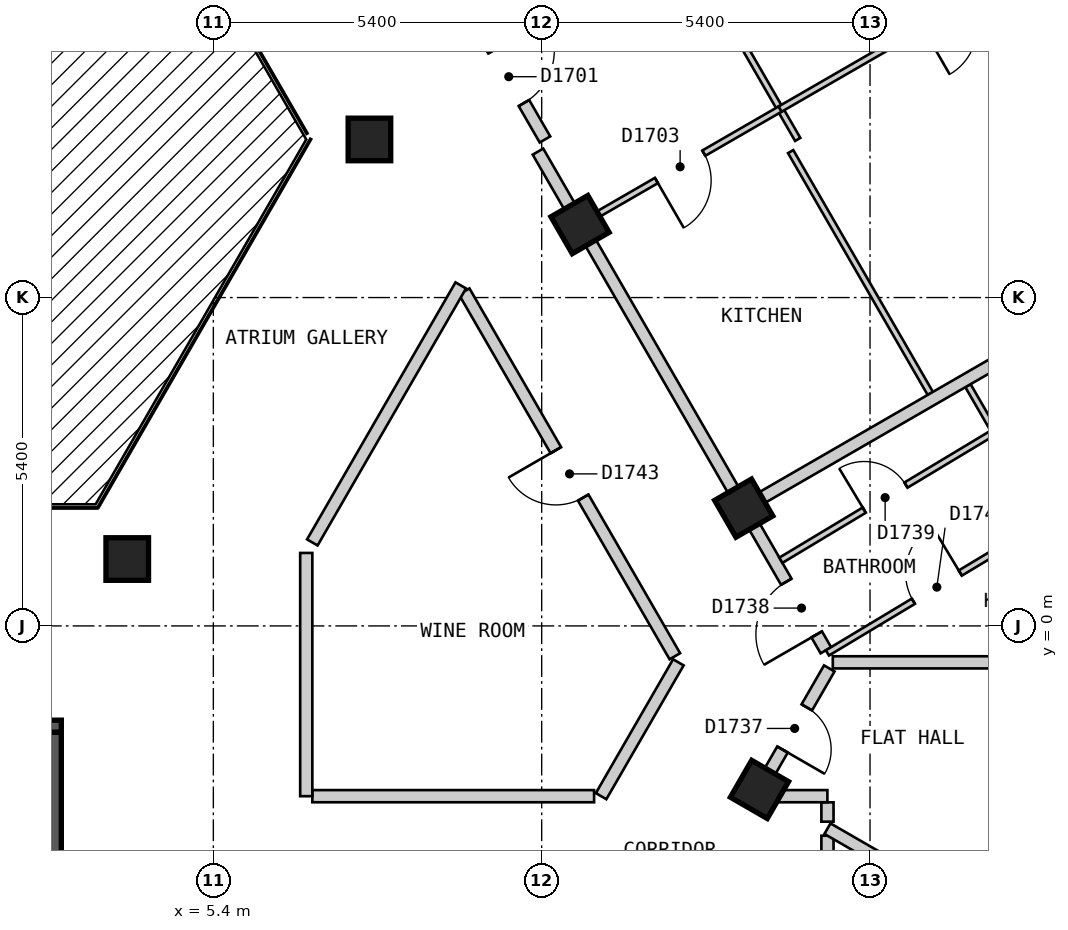
"""IFC4 building model, lengths in metres.
Left out: names, types, materials, properties, quantities, classifications, styles, units other than length and angle.
Written with IfcOpenShell. Run it as: python <this file> out.ifc"""

import sys

from ifc_helpers import new_model, si_unit, direction, frame, frame_2d, origin, origin_2d, place, context, subcontext, project, spatial, polyline, rectangle, outline, extrude, element, fill, save


model = new_model("IFC4")
c1 = context("Model", 3, precision=1e-05, world=origin(), true_north=direction((0.0, 1.0)))
c2 = subcontext(c1, "Body", "Model", "MODEL_VIEW")
j1 = project(units=[si_unit("LENGTHUNIT", "METRE"), si_unit("PLANEANGLEUNIT", "RADIAN")], contexts=[c1])
p1 = place(None, origin())
s1 = spatial("IfcSite", under=j1, at=p1, CompositionType="ELEMENT")
p2 = place(p1, origin())
s2 = spatial("IfcBuilding", under=s1, at=p2, CompositionType="ELEMENT")
p3 = place(p2, frame((0.0, 0.0, 187.2)))
s3 = spatial("IfcBuildingStorey", under=s2, at=p3, CompositionType="ELEMENT", Elevation=187.2)
for number, where, z_axis, x_axis in (
    (1, (14.382, -2.689, 0.0), (0.0, 0.0, 1.0), (0.5, 0.866, 0.0)),
    (2, (14.123, 1.937, 0.0), (0.0, 0.0, 1.0), (-0.5, 0.866, 0.0)),
    (3, (3.984, 1.1, 0.0), (0.0, 0.0, 1.0), (1.0, 0.0, 0.0)),
    (4, (11.431, 6.6, 0.0), (0.0, 0.0, 1.0), (-0.5, 0.866, 0.0)),
    (5, (7.967, 8.0, 0.0), (0.0, 0.0, 1.0), (1.0, 0.0, 0.0)),
):
    element("IfcColumn", number, at=place(p3, frame(where, z_axis=z_axis, x_axis=x_axis)), inside=s3, PredefinedType="COLUMN", context=c2, shape_type="SweptSolid", body=[
        extrude(rectangle(XDim=0.7, YDim=0.7, at=origin_2d()), origin(), (0.0, 0.0, 1.0), 3.0),
    ])
p4 = place(p3, frame((15.631, -21.025, 0.0), z_axis=(0.0, 0.0, 1.0), x_axis=(0.500018670445, 0.86601462413, 0.0)))
e6 = element("IfcWall", 6, at=p4, inside=s3, PredefinedType="SOLIDWALL", context=c2, shape_type="SweptSolid", body=[
    extrude(outline(polyline([(0.0, -0.15), (20.785, -0.15), (20.705, 0.15), (0.08, 0.15), (0.0, -0.15)])), origin(), (0.0, 0.0, 1.0), 2.7),
])
p5 = place(p4, frame((2.346, 0.0, 0.15)))
e7 = element("IfcOpeningElement", 7, at=p5, cuts=e6, PredefinedType="OPENING", context=c2, shape_type="SweptSolid", body=[
    extrude(rectangle(XDim=1.5, YDim=2.1, at=frame_2d((0.75, 1.05))), frame((0.0, 0.16, 0.0), z_axis=(0.0, -1.0, 0.0), x_axis=(1.0, 0.0, 0.0)), (0.0, 0.0, 1.0), 0.32),
])
p6 = place(p4, frame((7.21, 0.0, 0.15)))
e8 = element("IfcOpeningElement", 8, at=p6, cuts=e6, PredefinedType="OPENING", context=c2, shape_type="SweptSolid", body=[
    extrude(rectangle(XDim=1.5, YDim=2.1, at=frame_2d((0.75, 1.05))), frame((0.0, 0.16, 0.0), z_axis=(0.0, -1.0, 0.0), x_axis=(1.0, 0.0, 0.0)), (0.0, 0.0, 1.0), 0.32),
])
p7 = place(p4, frame((12.073, 0.0, 0.15)))
e9 = element("IfcOpeningElement", 9, at=p7, cuts=e6, PredefinedType="OPENING", context=c2, shape_type="SweptSolid", body=[
    extrude(rectangle(XDim=1.5, YDim=2.1, at=frame_2d((0.75, 1.05))), frame((0.0, 0.16, 0.0), z_axis=(0.0, -1.0, 0.0), x_axis=(1.0, 0.0, 0.0)), (0.0, 0.0, 1.0), 0.32),
])
p8 = place(p4, frame((16.938, 0.0, 0.15)))
e10 = element("IfcOpeningElement", 10, at=p8, cuts=e6, PredefinedType="OPENING", context=c2, shape_type="SweptSolid", body=[
    extrude(rectangle(XDim=1.5, YDim=2.1, at=frame_2d((0.75, 1.05))), frame((0.0, 0.16, 0.0), z_axis=(0.0, -1.0, 0.0), x_axis=(1.0, 0.0, 0.0)), (0.0, 0.0, 1.0), 0.32),
])
p9 = place(p3, frame((26.024, 1.825, 0.0), z_axis=(0.0, 0.0, 1.0), x_axis=(-0.500010537973, 0.866019319597, 0.0)))
e11 = element("IfcWall", 11, at=p9, inside=s3, PredefinedType="SOLIDWALL", context=c2, shape_type="SweptSolid", body=[
    extrude(outline(polyline([(0.0, -0.15), (22.863, -0.15), (22.783, 0.15), (0.08, 0.15), (0.0, -0.15)])), origin(), (0.0, 0.0, 1.0), 2.7),
])
p10 = place(p9, frame((2.606, 0.0, 0.15)))
e12 = element("IfcOpeningElement", 12, at=p10, cuts=e11, PredefinedType="OPENING", context=c2, shape_type="SweptSolid", body=[
    extrude(rectangle(XDim=1.5, YDim=2.1, at=frame_2d((0.75, 1.05))), frame((0.0, 0.16, 0.0), z_axis=(0.0, -1.0, 0.0), x_axis=(1.0, 0.0, 0.0)), (0.0, 0.0, 1.0), 0.32),
])
p11 = place(p9, frame((7.99, 0.0, 0.15)))
e13 = element("IfcOpeningElement", 13, at=p11, cuts=e11, PredefinedType="OPENING", context=c2, shape_type="SweptSolid", body=[
    extrude(rectangle(XDim=1.5, YDim=2.1, at=frame_2d((0.75, 1.05))), frame((0.0, 0.16, 0.0), z_axis=(0.0, -1.0, 0.0), x_axis=(1.0, 0.0, 0.0)), (0.0, 0.0, 1.0), 0.32),
])
p12 = place(p9, frame((13.373, 0.0, 0.15)))
e14 = element("IfcOpeningElement", 14, at=p12, cuts=e11, PredefinedType="OPENING", context=c2, shape_type="SweptSolid", body=[
    extrude(rectangle(XDim=1.5, YDim=2.1, at=frame_2d((0.75, 1.05))), frame((0.0, 0.16, 0.0), z_axis=(0.0, -1.0, 0.0), x_axis=(1.0, 0.0, 0.0)), (0.0, 0.0, 1.0), 0.32),
])
p13 = place(p9, frame((18.758, 0.0, 0.15)))
e15 = element("IfcOpeningElement", 15, at=p13, cuts=e11, PredefinedType="OPENING", context=c2, shape_type="SweptSolid", body=[
    extrude(rectangle(XDim=1.5, YDim=2.1, at=frame_2d((0.75, 1.05))), frame((0.0, 0.16, 0.0), z_axis=(0.0, -1.0, 0.0), x_axis=(1.0, 0.0, 0.0)), (0.0, 0.0, 1.0), 0.32),
])
p14 = place(p3, frame((-2.9, -1.65, 0.0), z_axis=(0.0, 0.0, 1.0), x_axis=(1.0, 0.0, 0.0)))
e16 = element("IfcWall", 16, at=p14, inside=s3, PredefinedType="SOLIDWALL", context=c2, shape_type="SweptSolid", body=[
    extrude(rectangle(XDim=5.8, YDim=0.2, at=frame_2d((2.9, 0.0))), origin(), (0.0, 0.0, 1.0), 2.7),
])
p15 = place(p14, frame((0.3, 0.0, 0.0)))
e17 = element("IfcOpeningElement", 17, at=p15, cuts=e16, PredefinedType="OPENING", context=c2, shape_type="SweptSolid", body=[
    extrude(rectangle(XDim=1.2, YDim=2.1, at=frame_2d((0.6, 1.05))), frame((0.0, 0.11, 0.0), z_axis=(0.0, -1.0, 0.0), x_axis=(1.0, 0.0, 0.0)), (0.0, 0.0, 1.0), 0.22),
])
p16 = place(p3, frame((2.8, -4.5, 0.0), z_axis=(0.0, 0.0, 1.0), x_axis=(0.0, 1.0, 0.0)))
e18 = element("IfcWall", 18, at=p16, inside=s3, PredefinedType="SOLIDWALL", context=c2, shape_type="SweptSolid", body=[
    extrude(rectangle(XDim=2.75, YDim=0.2, at=frame_2d((1.375, 0.0))), origin(), (0.0, 0.0, 1.0), 2.7),
])
p17 = place(p3, frame((9.526, 5.5, 0.0), z_axis=(0.0, 0.0, 1.0), x_axis=(0.500062092869, -0.865989551482, 0.0)))
e19 = element("IfcWall", 19, at=p17, inside=s3, PredefinedType="PARTITIONING", context=c2, shape_type="SweptSolid", body=[
    extrude(rectangle(XDim=6.927, YDim=0.2, at=frame_2d((3.464, 0.0))), origin(), (0.0, 0.0, 1.0), 2.7),
])
p18 = place(p17, frame((3.014, 0.0, 0.0)))
e20 = element("IfcOpeningElement", 20, at=p18, cuts=e19, PredefinedType="OPENING", context=c2, shape_type="SweptSolid", body=[
    extrude(rectangle(XDim=0.9, YDim=2.1, at=frame_2d((0.45, 1.05))), frame((0.0, 0.11, 0.0), z_axis=(0.0, -1.0, 0.0), x_axis=(1.0, 0.0, 0.0)), (0.0, 0.0, 1.0), 0.22),
])
p19 = place(p3, frame((10.739, 7.8, 0.0), z_axis=(0.0, 0.0, 1.0), x_axis=(0.500023726918, -0.866011704609, 0.0)))
e21 = element("IfcWall", 21, at=p19, inside=s3, PredefinedType="PARTITIONING", context=c2, shape_type="SweptSolid", body=[
    extrude(rectangle(XDim=9.47, YDim=0.2, at=frame_2d((4.735, 0.0))), origin(), (0.0, 0.0, 1.0), 2.7),
])
p20 = place(p19, frame((8.168, 0.0, 0.0)))
e22 = element("IfcOpeningElement", 22, at=p20, cuts=e21, PredefinedType="OPENING", context=c2, shape_type="SweptSolid", body=[
    extrude(rectangle(XDim=1.0, YDim=2.1, at=frame_2d((0.5, 1.05))), frame((0.0, 0.11, 0.0), z_axis=(0.0, -1.0, 0.0), x_axis=(1.0, 0.0, 0.0)), (0.0, 0.0, 1.0), 0.22),
])
p21 = place(p3, frame((5.485, 17.3, 0.0), z_axis=(0.0, 0.0, 1.0), x_axis=(0.499965832213, -0.866045129667, 0.0)))
e23 = element("IfcWall", 23, at=p21, inside=s3, PredefinedType="PARTITIONING", context=c2, shape_type="SweptSolid", body=[
    extrude(rectangle(XDim=10.739, YDim=0.2, at=frame_2d((5.369, 0.0))), origin(), (0.0, 0.0, 1.0), 2.7),
])
p22 = place(p21, frame((9.047, 0.0, 0.0)))
e24 = element("IfcOpeningElement", 24, at=p22, cuts=e23, PredefinedType="OPENING", context=c2, shape_type="SweptSolid", body=[
    extrude(rectangle(XDim=1.0, YDim=2.1, at=frame_2d((0.5, 1.05))), frame((0.0, 0.11, 0.0), z_axis=(0.0, -1.0, 0.0), x_axis=(1.0, 0.0, 0.0)), (0.0, 0.0, 1.0), 0.22),
])
p23 = place(p3, frame((15.5, -2.901, 0.0), z_axis=(0.0, 0.0, 1.0), x_axis=(0.0, -1.0, 0.0)))
e25 = element("IfcWall", 25, at=p23, inside=s3, PredefinedType="PARTITIONING", context=c2, shape_type="SweptSolid", body=[
    extrude(rectangle(XDim=0.318, YDim=0.2, at=frame_2d((0.159, 0.0))), origin(), (0.0, 0.0, 1.0), 2.7),
])
p24 = place(p3, frame((7.028, -2.8, 0.0), z_axis=(0.0, 0.0, 1.0), x_axis=(1.0, 0.0, 0.0)))
e26 = element("IfcWall", 26, at=p24, inside=s3, PredefinedType="PARTITIONING", context=c2, shape_type="SweptSolid", body=[
    extrude(rectangle(XDim=4.634, YDim=0.2, at=frame_2d((2.317, 0.0))), origin(), (0.0, 0.0, 1.0), 2.7),
])
p25 = place(p3, frame((14.433, -2.8, 0.0), z_axis=(0.0, 0.0, 1.0), x_axis=(1.0, 0.0, 0.0)))
e27 = element("IfcWall", 27, at=p25, inside=s3, PredefinedType="PARTITIONING", context=c2, shape_type="SweptSolid", body=[
    extrude(rectangle(XDim=1.066, YDim=0.2, at=frame_2d((0.533, 0.0))), origin(), (0.0, 0.0, 1.0), 2.7),
])
p26 = place(p3, frame((7.028, 1.373, 0.0), z_axis=(0.0, 0.0, 1.0), x_axis=(0.500065924398, 0.86598733897, 0.0)))
e28 = element("IfcWall", 28, at=p26, inside=s3, PredefinedType="PARTITIONING", context=c2, shape_type="SweptSolid", body=[
    extrude(rectangle(XDim=4.881, YDim=0.2, at=frame_2d((2.44, 0.0))), origin(), (0.0, 0.0, 1.0), 2.7),
])
p27 = place(p3, frame((11.777, -2.8, 0.0), z_axis=(0.0, 0.0, 1.0), x_axis=(0.500085537782, 0.86597601289, 0.0)))
e29 = element("IfcWall", 29, at=p27, inside=s3, PredefinedType="PARTITIONING", context=c2, shape_type="SweptSolid", body=[
    extrude(rectangle(XDim=2.542, YDim=0.2, at=frame_2d((1.271, 0.0))), origin(), (0.0, 0.0, 1.0), 2.7),
])
p28 = place(p3, frame((14.318, -2.8, 0.0), z_axis=(0.0, 0.0, 1.0), x_axis=(0.49964693309, 0.866229151122, 0.0)))
e30 = element("IfcWall", 30, at=p28, inside=s3, PredefinedType="PARTITIONING", context=c2, shape_type="SweptSolid", body=[
    extrude(rectangle(XDim=2.426, YDim=0.2, at=frame_2d((1.213, 0.0))), origin(), (0.0, 0.0, 1.0), 2.7),
])
p29 = place(p28, frame((0.886, 0.0, 0.0)))
e31 = element("IfcOpeningElement", 31, at=p29, cuts=e30, PredefinedType="OPENING", context=c2, shape_type="SweptSolid", body=[
    extrude(rectangle(XDim=0.8, YDim=2.1, at=frame_2d((0.4, 1.05))), frame((0.0, 0.11, 0.0), z_axis=(0.0, -1.0, 0.0), x_axis=(1.0, 0.0, 0.0)), (0.0, 0.0, 1.0), 0.22),
])
p30 = place(p3, frame((6.928, -2.8, 0.0), z_axis=(0.0, 0.0, 1.0), x_axis=(0.0, 1.0, 0.0)))
e32 = element("IfcWall", 32, at=p30, inside=s3, PredefinedType="PARTITIONING", context=c2, shape_type="SweptSolid", body=[
    extrude(rectangle(XDim=4.0, YDim=0.2, at=frame_2d((2.0, 0.0))), origin(), (0.0, 0.0, 1.0), 2.7),
])
p31 = place(p3, frame((15.5, -18.799, 0.0), z_axis=(0.0, 0.0, 1.0), x_axis=(0.0, 1.0, 0.0)))
e33 = element("IfcWall", 33, at=p31, inside=s3, PredefinedType="PARTITIONING", context=c2, shape_type="SweptSolid", body=[
    extrude(rectangle(XDim=15.349, YDim=0.2, at=frame_2d((7.675, 0.0))), origin(), (0.0, 0.0, 1.0), 2.7),
])
p32 = place(p31, frame((11.348, 0.0, 0.0)))
e34 = element("IfcOpeningElement", 34, at=p32, cuts=e33, PredefinedType="OPENING", context=c2, shape_type="SweptSolid", body=[
    extrude(rectangle(XDim=1.0, YDim=2.1, at=frame_2d((0.5, 1.05))), frame((0.0, 0.11, 0.0), z_axis=(0.0, -1.0, 0.0), x_axis=(1.0, 0.0, 0.0)), (0.0, 0.0, 1.0), 0.22),
])
p33 = place(p3, frame((14.895, 7.8, 0.0), z_axis=(0.0, 0.0, 1.0), x_axis=(0.500050787847, -0.865996079421, 0.0)))
e35 = element("IfcWall", 35, at=p33, inside=s3, PredefinedType="PARTITIONING", context=c2, shape_type="SweptSolid", body=[
    extrude(rectangle(XDim=4.591, YDim=0.1, at=frame_2d((2.296, 0.0))), origin(), (0.0, 0.0, 1.0), 2.7),
])
p34 = place(p3, frame((9.526, 17.5, 0.0), z_axis=(0.0, 0.0, 1.0), x_axis=(0.500019134094, -0.866014356428, 0.0)))
e36 = element("IfcWall", 36, at=p34, inside=s3, PredefinedType="PARTITIONING", context=c2, shape_type="SweptSolid", body=[
    extrude(rectangle(XDim=10.97, YDim=0.1, at=frame_2d((5.485, 0.0))), origin(), (0.0, 0.0, 1.0), 2.7),
])
p35 = place(p34, frame((7.25, 0.0, 0.0)))
e37 = element("IfcOpeningElement", 37, at=p35, cuts=e36, PredefinedType="OPENING", context=c2, shape_type="SweptSolid", body=[
    extrude(rectangle(XDim=0.9, YDim=2.1, at=frame_2d((0.45, 1.05))), frame((0.0, 0.06, 0.0), z_axis=(0.0, -1.0, 0.0), x_axis=(1.0, 0.0, 0.0)), (0.0, 0.0, 1.0), 0.12),
])
p36 = place(p3, frame((17.811, 3.951, 0.0), z_axis=(0.0, 0.0, 1.0), x_axis=(0.499976149225, -0.866039173598, 0.0)))
e38 = element("IfcWall", 38, at=p36, inside=s3, PredefinedType="PARTITIONING", context=c2, shape_type="SweptSolid", body=[
    extrude(rectangle(XDim=2.888, YDim=0.1, at=frame_2d((1.444, 0.0))), origin(), (0.0, 0.0, 1.0), 2.7),
])
p37 = place(p36, frame((1.276, 0.0, 0.0)))
e39 = element("IfcOpeningElement", 39, at=p37, cuts=e38, PredefinedType="OPENING", context=c2, shape_type="SweptSolid", body=[
    extrude(rectangle(XDim=0.9, YDim=2.1, at=frame_2d((0.45, 1.05))), frame((0.0, 0.06, 0.0), z_axis=(0.0, -1.0, 0.0), x_axis=(1.0, 0.0, 0.0)), (0.0, 0.0, 1.0), 0.12),
])
p38 = place(p3, frame((11.518, 6.65, 0.0), z_axis=(0.0, 0.0, 1.0), x_axis=(0.865984470368, 0.500070892056, 0.0)))
e40 = element("IfcWall", 40, at=p38, inside=s3, PredefinedType="PARTITIONING", context=c2, shape_type="SweptSolid", body=[
    extrude(rectangle(XDim=3.7, YDim=0.1, at=frame_2d((1.85, 0.0))), origin(), (0.0, 0.0, 1.0), 2.7),
])
p39 = place(p38, frame((1.35, 0.0, 0.0)))
e41 = element("IfcOpeningElement", 41, at=p39, cuts=e40, PredefinedType="OPENING", context=c2, shape_type="SweptSolid", body=[
    extrude(rectangle(XDim=0.9, YDim=2.1, at=frame_2d((0.45, 1.05))), frame((0.0, 0.06, 0.0), z_axis=(0.0, -1.0, 0.0), x_axis=(1.0, 0.0, 0.0)), (0.0, 0.0, 1.0), 0.12),
])
p40 = place(p3, frame((14.734, 1.08, 0.0), z_axis=(0.0, 0.0, 1.0), x_axis=(0.857205608004, 0.514974315482, 0.0)))
e42 = element("IfcWall", 42, at=p40, inside=s3, PredefinedType="PARTITIONING", context=c2, shape_type="SweptSolid", body=[
    extrude(rectangle(XDim=4.051, YDim=0.1, at=frame_2d((2.025, 0.0))), origin(), (0.0, 0.0, 1.0), 2.7),
])
p41 = place(p40, frame((1.6, 0.0, 0.0)))
e43 = element("IfcOpeningElement", 43, at=p41, cuts=e42, PredefinedType="OPENING", context=c2, shape_type="SweptSolid", body=[
    extrude(rectangle(XDim=0.8, YDim=2.1, at=frame_2d((0.4, 1.05))), frame((0.0, 0.06, 0.0), z_axis=(0.0, -1.0, 0.0), x_axis=(1.0, 0.0, 0.0)), (0.0, 0.0, 1.0), 0.12),
])
p42 = place(p3, frame((15.499, -0.444, 0.0), z_axis=(0.0, 0.0, 1.0), x_axis=(0.857061798163, 0.515213619899, 0.0)))
e44 = element("IfcWall", 44, at=p42, inside=s3, PredefinedType="PARTITIONING", context=c2, shape_type="SweptSolid", body=[
    extrude(rectangle(XDim=4.15, YDim=0.1, at=frame_2d((2.075, 0.0))), origin(), (0.0, 0.0, 1.0), 2.7),
])
p43 = place(p42, frame((1.65, 0.0, 0.0)))
e45 = element("IfcOpeningElement", 45, at=p43, cuts=e44, PredefinedType="OPENING", context=c2, shape_type="SweptSolid", body=[
    extrude(rectangle(XDim=0.9, YDim=2.1, at=frame_2d((0.45, 1.05))), frame((0.0, 0.06, 0.0), z_axis=(0.0, -1.0, 0.0), x_axis=(1.0, 0.0, 0.0)), (0.0, 0.0, 1.0), 0.12),
])
p44 = place(p3, frame((15.5, -3.334, 0.0), z_axis=(0.0, 0.0, 1.0), x_axis=(0.866001896501, -0.5000407136, 0.0)))
e46 = element("IfcWall", 46, at=p44, inside=s3, PredefinedType="PARTITIONING", context=c2, shape_type="SweptSolid", body=[
    extrude(rectangle(XDim=8.809, YDim=0.2, at=frame_2d((4.405, 0.0))), origin(), (0.0, 0.0, 1.0), 2.7),
])
p45 = place(p3, frame((15.588, -0.599, 0.0), z_axis=(0.0, 0.0, 1.0), x_axis=(1.0, 0.0, 0.0)))
e47 = element("IfcWall", 47, at=p45, inside=s3, PredefinedType="PARTITIONING", context=c2, shape_type="SweptSolid", body=[
    extrude(rectangle(XDim=10.266, YDim=0.2, at=frame_2d((5.133, 0.0))), origin(), (0.0, 0.0, 1.0), 2.7),
])
p46 = place(p3, frame((14.21, 1.987, 0.0), z_axis=(0.0, 0.0, 1.0), x_axis=(0.866022959057, 0.500004234368, 0.0)))
e48 = element("IfcWall", 48, at=p46, inside=s3, PredefinedType="PARTITIONING", context=c2, shape_type="SweptSolid", body=[
    extrude(rectangle(XDim=10.0, YDim=0.2, at=frame_2d((5.0, 0.0))), origin(), (0.0, 0.0, 1.0), 2.7),
])
p47 = place(p3, frame((14.722, 8.5, 0.0), z_axis=(0.0, 0.0, 1.0), x_axis=(0.866035871367, 0.499981869177, 0.0)))
e49 = element("IfcWall", 49, at=p47, inside=s3, PredefinedType="PARTITIONING", context=c2, shape_type="SweptSolid", body=[
    extrude(rectangle(XDim=6.3, YDim=0.1, at=frame_2d((3.15, 0.0))), origin(), (0.0, 0.0, 1.0), 2.7),
])
p48 = place(p47, frame((2.7, 0.0, 0.0)))
e50 = element("IfcOpeningElement", 50, at=p48, cuts=e49, PredefinedType="OPENING", context=c2, shape_type="SweptSolid", body=[
    extrude(rectangle(XDim=0.9, YDim=2.1, at=frame_2d((0.45, 1.05))), frame((0.0, 0.06, 0.0), z_axis=(0.0, -1.0, 0.0), x_axis=(1.0, 0.0, 0.0)), (0.0, 0.0, 1.0), 0.12),
])
p49 = place(p22, origin())
e51 = element("IfcDoor", 51, at=p49, inside=s3, OperationType="SINGLE_SWING_LEFT", PredefinedType="DOOR", context=c2, shape_type="SweptSolid", body=[
    extrude(rectangle(XDim=1.0, YDim=2.1, at=frame_2d((0.5, 1.05))), frame((0.0, 0.025, 0.0), z_axis=(0.0, -1.0, 0.0), x_axis=(1.0, 0.0, 0.0)), (0.0, 0.0, 1.0), 0.05),
])
fill(e24, e51)
p50 = place(p39, origin())
e52 = element("IfcDoor", 52, at=p50, inside=s3, OperationType="SINGLE_SWING_LEFT", PredefinedType="DOOR", context=c2, shape_type="SweptSolid", body=[
    extrude(rectangle(XDim=0.9, YDim=2.1, at=frame_2d((0.45, 1.05))), frame((0.0, 0.025, 0.0), z_axis=(0.0, -1.0, 0.0), x_axis=(1.0, 0.0, 0.0)), (0.0, 0.0, 1.0), 0.05),
])
fill(e41, e52)
p51 = place(p29, origin())
e53 = element("IfcDoor", 53, at=p51, inside=s3, OperationType="SINGLE_SWING_LEFT", PredefinedType="DOOR", context=c2, shape_type="SweptSolid", body=[
    extrude(rectangle(XDim=0.8, YDim=2.1, at=frame_2d((0.4, 1.05))), frame((0.0, 0.025, 0.0), z_axis=(0.0, -1.0, 0.0), x_axis=(1.0, 0.0, 0.0)), (0.0, 0.0, 1.0), 0.05),
])
fill(e31, e53)
p52 = place(p20, origin())
e54 = element("IfcDoor", 54, at=p52, inside=s3, OperationType="SINGLE_SWING_RIGHT", PredefinedType="DOOR", context=c2, shape_type="SweptSolid", body=[
    extrude(rectangle(XDim=1.0, YDim=2.1, at=frame_2d((0.5, 1.05))), frame((0.0, 0.025, 0.0), z_axis=(0.0, -1.0, 0.0), x_axis=(1.0, 0.0, 0.0)), (0.0, 0.0, 1.0), 0.05),
])
fill(e22, e54)
p53 = place(p41, origin())
e55 = element("IfcDoor", 55, at=p53, inside=s3, OperationType="SINGLE_SWING_LEFT", PredefinedType="DOOR", context=c2, shape_type="SweptSolid", body=[
    extrude(rectangle(XDim=0.8, YDim=2.1, at=frame_2d((0.4, 1.05))), frame((0.0, 0.025, 0.0), z_axis=(0.0, -1.0, 0.0), x_axis=(1.0, 0.0, 0.0)), (0.0, 0.0, 1.0), 0.05),
])
fill(e43, e55)
p54 = place(p43, origin())
e56 = element("IfcDoor", 56, at=p54, inside=s3, OperationType="SINGLE_SWING_RIGHT", PredefinedType="DOOR", context=c2, shape_type="SweptSolid", body=[
    extrude(rectangle(XDim=0.9, YDim=2.1, at=frame_2d((0.45, 1.05))), frame((0.0, 0.025, 0.0), z_axis=(0.0, -1.0, 0.0), x_axis=(1.0, 0.0, 0.0)), (0.0, 0.0, 1.0), 0.05),
])
fill(e45, e56)
p55 = place(p18, origin())
e57 = element("IfcDoor", 57, at=p55, inside=s3, OperationType="SINGLE_SWING_LEFT", PredefinedType="DOOR", context=c2, shape_type="SweptSolid", body=[
    extrude(rectangle(XDim=0.9, YDim=2.1, at=frame_2d((0.45, 1.05))), frame((0.0, 0.025, 0.0), z_axis=(0.0, -1.0, 0.0), x_axis=(1.0, 0.0, 0.0)), (0.0, 0.0, 1.0), 0.05),
])
fill(e20, e57)
save(model, sys.argv[1])
